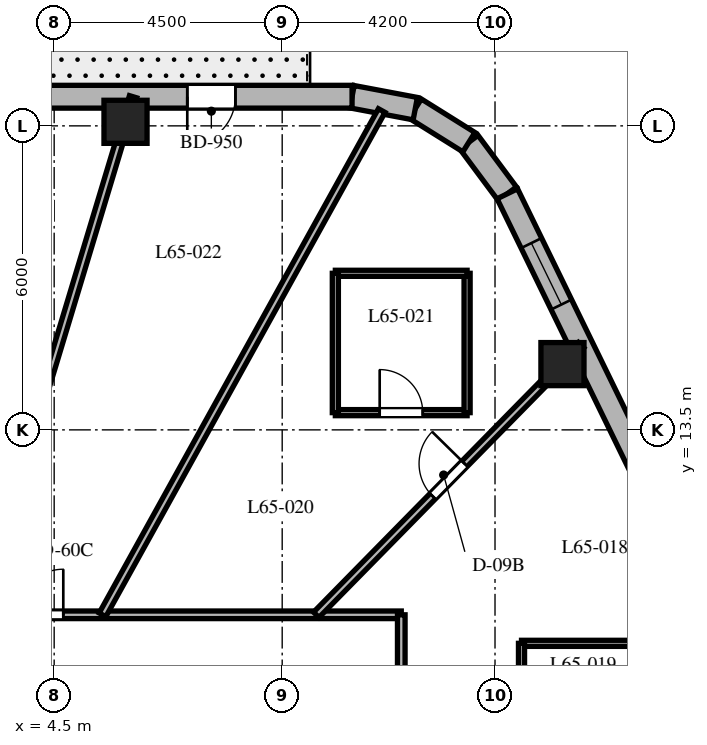
"""IFC4 building model, lengths in metres.
Left out: names, types, materials, properties, quantities, classifications, styles, units other than length and angle.
Written with IfcOpenShell. Run it as: python <this file> out.ifc"""

import sys

from ifc_helpers import new_model, si_unit, direction, frame, frame_2d, origin, origin_2d, place, context, subcontext, project, spatial, rectangle, extrude, element, fill, save


model = new_model("IFC4")
c1 = context("Model", 3, precision=1e-05, world=origin(), true_north=direction((0.0, 1.0)))
c2 = subcontext(c1, "Body", "Model", "MODEL_VIEW")
j1 = project(units=[si_unit("LENGTHUNIT", "METRE"), si_unit("PLANEANGLEUNIT", "RADIAN")], contexts=[c1])
p1 = place(None, origin())
s1 = spatial("IfcSite", under=j1, at=p1, CompositionType="ELEMENT")
p2 = place(p1, origin())
s2 = spatial("IfcBuilding", under=s1, at=p2, CompositionType="ELEMENT")
p3 = place(p2, frame((0.0, 0.0, 261.3)))
s3 = spatial("IfcBuildingStorey", under=s2, at=p3, CompositionType="ELEMENT", Elevation=261.3)
for number, where, z_axis, x_axis in (
    (1, (14.531, 14.798, 0.0), (0.0, 0.0, 1.0), (1.0, 0.0, 0.0)),
    (2, (5.908, 19.58, 0.0), (0.0, 0.0, 1.0), (1.0, 0.0, 0.0)),
):
    element("IfcColumn", number, at=place(p3, frame(where, z_axis=z_axis, x_axis=x_axis)), inside=s3, PredefinedType="COLUMN", context=c2, shape_type="SweptSolid", body=[
        extrude(rectangle(XDim=0.85, YDim=0.85, at=origin_2d()), origin(), (0.0, 0.0, 1.0), 3.9),
    ])
p4 = place(p3, frame((13.443, 18.16, 0.0), z_axis=(0.0, 0.0, 1.0), x_axis=(-0.597042425808, 0.802209661987, 0.0)))
e3 = element("IfcWall", 3, at=p4, inside=s3, PredefinedType="SOLIDWALL", context=c2, shape_type="SweptSolid", body=[
    extrude(rectangle(XDim=1.27, YDim=0.45, at=frame_2d((0.635, 0.0))), origin(), (0.0, 0.0, 1.0), 3.6),
])
p5 = place(p3, frame((12.685, 19.178, 0.0), z_axis=(0.0, 0.0, 1.0), x_axis=(-0.848031272749, 0.529946186362, 0.0)))
e4 = element("IfcWall", 4, at=p5, inside=s3, PredefinedType="SOLIDWALL", context=c2, shape_type="SweptSolid", body=[
    extrude(rectangle(XDim=1.248, YDim=0.45, at=frame_2d((0.624, 0.0))), origin(), (0.0, 0.0, 1.0), 3.6),
])
p6 = place(p3, frame((11.626, 19.84, 0.0), z_axis=(0.0, 0.0, 1.0), x_axis=(-0.982701956681, 0.185194126083, 0.0)))
e5 = element("IfcWall", 5, at=p6, inside=s3, PredefinedType="SOLIDWALL", context=c2, shape_type="SweptSolid", body=[
    extrude(rectangle(XDim=1.27, YDim=0.45, at=frame_2d((0.635, 0.0))), origin(), (0.0, 0.0, 1.0), 3.6),
])
p7 = place(p3, frame((21.138, 2.371, 0.0), z_axis=(0.0, 0.0, 1.0), x_axis=(-0.438128124058, 0.89891253574, 0.0)))
e6 = element("IfcWall", 6, at=p7, inside=s3, PredefinedType="SOLIDWALL", context=c2, shape_type="SweptSolid", body=[
    extrude(rectangle(XDim=17.565, YDim=0.45, at=frame_2d((8.782, 0.0))), origin(), (0.0, 0.0, 1.0), 3.6),
])
p8 = place(p7, frame((1.133, 0.0, 0.8)))
e7 = element("IfcOpeningElement", 7, at=p8, cuts=e6, PredefinedType="OPENING", context=c2, shape_type="SweptSolid", body=[
    extrude(rectangle(XDim=1.35, YDim=1.75, at=frame_2d((0.675, 0.875))), frame((0.0, 0.235, 0.0), z_axis=(0.0, -1.0, 0.0), x_axis=(1.0, 0.0, 0.0)), (0.0, 0.0, 1.0), 0.47),
])
p9 = place(p7, frame((8.158, 0.0, 0.8)))
e8 = element("IfcOpeningElement", 8, at=p9, cuts=e6, PredefinedType="OPENING", context=c2, shape_type="SweptSolid", body=[
    extrude(rectangle(XDim=1.35, YDim=1.75, at=frame_2d((0.675, 0.875))), frame((0.0, 0.235, 0.0), z_axis=(0.0, -1.0, 0.0), x_axis=(1.0, 0.0, 0.0)), (0.0, 0.0, 1.0), 0.47),
])
p10 = place(p7, frame((15.132, 0.0, 0.8)))
e9 = element("IfcOpeningElement", 9, at=p10, cuts=e6, PredefinedType="OPENING", context=c2, shape_type="SweptSolid", body=[
    extrude(rectangle(XDim=1.35, YDim=1.75, at=frame_2d((0.675, 0.875))), frame((0.0, 0.235, 0.0), z_axis=(0.0, -1.0, 0.0), x_axis=(1.0, 0.0, 0.0)), (0.0, 0.0, 1.0), 0.47),
])
p11 = place(p3, frame((10.379, 20.075, 0.0), z_axis=(0.0, 0.0, 1.0), x_axis=(-1.0, 0.0, 0.0)))
e10 = element("IfcWall", 10, at=p11, inside=s3, PredefinedType="SOLIDWALL", context=c2, shape_type="SweptSolid", body=[
    extrude(rectangle(XDim=22.417, YDim=0.45, at=frame_2d((11.208, 0.0))), origin(), (0.0, 0.0, 1.0), 3.6),
])
p12 = place(p11, frame((2.302, 0.0, 0.0)))
e11 = element("IfcOpeningElement", 11, at=p12, cuts=e10, PredefinedType="OPENING", context=c2, shape_type="SweptSolid", body=[
    extrude(rectangle(XDim=0.95, YDim=2.15, at=frame_2d((0.475, 1.075))), frame((0.0, 0.235, 0.0), z_axis=(0.0, -1.0, 0.0), x_axis=(1.0, 0.0, 0.0)), (0.0, 0.0, 1.0), 0.47),
])
p13 = place(p11, frame((7.022, 0.0, 0.8)))
e12 = element("IfcOpeningElement", 12, at=p13, cuts=e10, PredefinedType="OPENING", context=c2, shape_type="SweptSolid", body=[
    extrude(rectangle(XDim=1.35, YDim=1.75, at=frame_2d((0.675, 0.875))), frame((0.0, 0.235, 0.0), z_axis=(0.0, -1.0, 0.0), x_axis=(1.0, 0.0, 0.0)), (0.0, 0.0, 1.0), 0.47),
])
p14 = place(p11, frame((13.18, 0.0, 0.8)))
e13 = element("IfcOpeningElement", 13, at=p14, cuts=e10, PredefinedType="OPENING", context=c2, shape_type="SweptSolid", body=[
    extrude(rectangle(XDim=1.35, YDim=1.75, at=frame_2d((0.675, 0.875))), frame((0.0, 0.235, 0.0), z_axis=(0.0, -1.0, 0.0), x_axis=(1.0, 0.0, 0.0)), (0.0, 0.0, 1.0), 0.47),
])
p15 = place(p11, frame((19.587, 0.0, 0.8)))
e14 = element("IfcOpeningElement", 14, at=p15, cuts=e10, PredefinedType="OPENING", context=c2, shape_type="SweptSolid", body=[
    extrude(rectangle(XDim=1.35, YDim=1.75, at=frame_2d((0.675, 0.875))), frame((0.0, 0.235, 0.0), z_axis=(0.0, -1.0, 0.0), x_axis=(1.0, 0.0, 0.0)), (0.0, 0.0, 1.0), 0.47),
])
p16 = place(p3, frame((0.92, 9.85, 0.0), z_axis=(0.0, 0.0, 1.0), x_axis=(1.0, 0.0, 0.0)))
e15 = element("IfcWall", 15, at=p16, inside=s3, PredefinedType="PARTITIONING", context=c2, shape_type="SweptSolid", body=[
    extrude(rectangle(XDim=10.43, YDim=0.15, at=frame_2d((5.215, 0.0))), origin(), (0.0, 0.0, 1.0), 3.09),
])
p17 = place(p16, frame((2.86, 0.0, 0.0)))
e16 = element("IfcOpeningElement", 16, at=p17, cuts=e15, PredefinedType="OPENING", context=c2, shape_type="SweptSolid", body=[
    extrude(rectangle(XDim=0.9, YDim=2.03, at=frame_2d((0.45, 1.015))), frame((0.0, 0.085, 0.0), z_axis=(0.0, -1.0, 0.0), x_axis=(1.0, 0.0, 0.0)), (0.0, 0.0, 1.0), 0.17),
])
p18 = place(p3, frame((11.35, 9.85, 0.0), z_axis=(0.0, 0.0, 1.0), x_axis=(0.0, -1.0, 0.0)))
e17 = element("IfcWall", 17, at=p18, inside=s3, PredefinedType="PARTITIONING", context=c2, shape_type="SweptSolid", body=[
    extrude(rectangle(XDim=12.4, YDim=0.15, at=frame_2d((6.2, 0.0))), origin(), (0.0, 0.0, 1.0), 3.09),
])
p19 = place(p18, frame((7.697, 0.0, 0.0)))
e18 = element("IfcOpeningElement", 18, at=p19, cuts=e17, PredefinedType="OPENING", context=c2, shape_type="SweptSolid", body=[
    extrude(rectangle(XDim=0.95, YDim=2.03, at=frame_2d((0.475, 1.015))), frame((0.0, 0.085, 0.0), z_axis=(0.0, -1.0, 0.0), x_axis=(1.0, 0.0, 0.0)), (0.0, 0.0, 1.0), 0.17),
])
p20 = place(p18, frame((2.973, 0.0, 0.0)))
e19 = element("IfcOpeningElement", 19, at=p20, cuts=e17, PredefinedType="OPENING", context=c2, shape_type="SweptSolid", body=[
    extrude(rectangle(XDim=1.0, YDim=2.03, at=frame_2d((0.5, 1.015))), frame((0.0, 0.085, 0.0), z_axis=(0.0, -1.0, 0.0), x_axis=(1.0, 0.0, 0.0)), (0.0, 0.0, 1.0), 0.17),
])
p21 = place(p18, frame((10.333, 0.0, 0.0)))
e20 = element("IfcOpeningElement", 20, at=p21, cuts=e17, PredefinedType="OPENING", context=c2, shape_type="SweptSolid", body=[
    extrude(rectangle(XDim=0.9, YDim=2.03, at=frame_2d((0.45, 1.015))), frame((0.0, 0.085, 0.0), z_axis=(0.0, -1.0, 0.0), x_axis=(1.0, 0.0, 0.0)), (0.0, 0.0, 1.0), 0.17),
])
p22 = place(p3, frame((9.672, 9.85, 0.0), z_axis=(0.0, 0.0, 1.0), x_axis=(0.700629771301, 0.713524998558, 0.0)))
e21 = element("IfcWall", 21, at=p22, inside=s3, PredefinedType="PARTITIONING", context=c2, shape_type="SweptSolid", body=[
    extrude(rectangle(XDim=7.459, YDim=0.15, at=frame_2d((3.73, 0.0))), origin(), (0.0, 0.0, 1.0), 2.94),
])
p23 = place(p22, frame((3.28, 0.0, 0.0)))
e22 = element("IfcOpeningElement", 22, at=p23, cuts=e21, PredefinedType="OPENING", context=c2, shape_type="SweptSolid", body=[
    extrude(rectangle(XDim=0.9, YDim=2.03, at=frame_2d((0.45, 1.015))), frame((0.0, 0.085, 0.0), z_axis=(0.0, -1.0, 0.0), x_axis=(1.0, 0.0, 0.0)), (0.0, 0.0, 1.0), 0.17),
])
p24 = place(p3, frame((5.454, 9.85, 0.0), z_axis=(0.0, 0.0, 1.0), x_axis=(0.48439420613, 0.874849846012, 0.0)))
e23 = element("IfcWall", 23, at=p24, inside=s3, PredefinedType="PARTITIONING", context=c2, shape_type="SweptSolid", body=[
    extrude(rectangle(XDim=11.375, YDim=0.15, at=frame_2d((5.688, 0.0))), origin(), (0.0, 0.0, 1.0), 2.94),
])
p25 = place(p3, frame((2.972, 9.85, 0.0), z_axis=(0.0, 0.0, 1.0), x_axis=(0.288872169679, 0.957367677324, 0.0)))
e24 = element("IfcWall", 24, at=p25, inside=s3, PredefinedType="PARTITIONING", context=c2, shape_type="SweptSolid", body=[
    extrude(rectangle(XDim=10.68, YDim=0.15, at=frame_2d((5.34, 0.0))), origin(), (0.0, 0.0, 1.0), 2.94),
])
p26 = place(p3, frame((16.163, 9.287, 0.0), z_axis=(0.0, 0.0, 1.0), x_axis=(-1.0, 0.0, 0.0)))
e25 = element("IfcWall", 25, at=p26, inside=s3, PredefinedType="PARTITIONING", context=c2, shape_type="SweptSolid", body=[
    extrude(rectangle(XDim=2.44, YDim=0.12, at=frame_2d((1.22, 0.0))), origin(), (0.0, 0.0, 1.0), 3.126),
])
p27 = place(p3, frame((13.723, 9.287, 0.0), z_axis=(0.0, 0.0, 1.0), x_axis=(0.0, -1.0, 0.0)))
e26 = element("IfcWall", 26, at=p27, inside=s3, PredefinedType="PARTITIONING", context=c2, shape_type="SweptSolid", body=[
    extrude(rectangle(XDim=2.61, YDim=0.12, at=frame_2d((1.305, 0.0))), origin(), (0.0, 0.0, 1.0), 3.6),
])
p28 = place(p3, frame((10.049, 13.84, 0.0), z_axis=(0.0, 0.0, 1.0), x_axis=(1.0, 0.0, 0.0)))
e27 = element("IfcWall", 27, at=p28, inside=s3, PredefinedType="PARTITIONING", context=c2, shape_type="SweptSolid", body=[
    extrude(rectangle(XDim=2.6, YDim=0.12, at=frame_2d((1.3, 0.0))), origin(), (0.0, 0.0, 1.0), 3.6),
])
p29 = place(p28, frame((0.875, 0.0, 0.0)))
e28 = element("IfcOpeningElement", 28, at=p29, cuts=e27, PredefinedType="OPENING", context=c2, shape_type="SweptSolid", body=[
    extrude(rectangle(XDim=0.85, YDim=2.03, at=frame_2d((0.425, 1.015))), frame((0.0, 0.07, 0.0), z_axis=(0.0, -1.0, 0.0), x_axis=(1.0, 0.0, 0.0)), (0.0, 0.0, 1.0), 0.14),
])
p30 = place(p3, frame((12.649, 13.84, 0.0), z_axis=(0.0, 0.0, 1.0), x_axis=(0.0, 1.0, 0.0)))
e29 = element("IfcWall", 29, at=p30, inside=s3, PredefinedType="PARTITIONING", context=c2, shape_type="SweptSolid", body=[
    extrude(rectangle(XDim=2.75, YDim=0.12, at=frame_2d((1.375, 0.0))), origin(), (0.0, 0.0, 1.0), 2.94),
])
p31 = place(p3, frame((12.649, 16.59, 0.0), z_axis=(0.0, 0.0, 1.0), x_axis=(-1.0, 0.0, 0.0)))
e30 = element("IfcWall", 30, at=p31, inside=s3, PredefinedType="PARTITIONING", context=c2, shape_type="SweptSolid", body=[
    extrude(rectangle(XDim=2.6, YDim=0.12, at=frame_2d((1.3, 0.0))), origin(), (0.0, 0.0, 1.0), 2.94),
])
p32 = place(p3, frame((10.049, 16.59, 0.0), z_axis=(0.0, 0.0, 1.0), x_axis=(0.0, -1.0, 0.0)))
e31 = element("IfcWall", 31, at=p32, inside=s3, PredefinedType="PARTITIONING", context=c2, shape_type="SweptSolid", body=[
    extrude(rectangle(XDim=2.75, YDim=0.12, at=frame_2d((1.375, 0.0))), origin(), (0.0, 0.0, 1.0), 3.6),
])
p33 = place(p10, origin())
e32 = element("IfcWindow", 32, at=p33, inside=s3, PartitioningType="SINGLE_PANEL", PredefinedType="WINDOW", context=c2, shape_type="SweptSolid", body=[
    extrude(rectangle(XDim=1.35, YDim=1.75, at=frame_2d((0.675, 0.875))), frame((0.0, 0.03, 0.0), z_axis=(0.0, -1.0, 0.0), x_axis=(1.0, 0.0, 0.0)), (0.0, 0.0, 1.0), 0.06),
])
fill(e9, e32)
p34 = place(p12, origin())
e33 = element("IfcDoor", 33, at=p34, inside=s3, OperationType="SINGLE_SWING_RIGHT", PredefinedType="DOOR", context=c2, shape_type="SweptSolid", body=[
    extrude(rectangle(XDim=0.95, YDim=2.15, at=frame_2d((0.475, 1.075))), frame((0.0, 0.025, 0.0), z_axis=(0.0, -1.0, 0.0), x_axis=(1.0, 0.0, 0.0)), (0.0, 0.0, 1.0), 0.05),
])
fill(e11, e33)
p35 = place(p23, origin())
e34 = element("IfcDoor", 34, at=p35, inside=s3, OperationType="SINGLE_SWING_RIGHT", PredefinedType="DOOR", context=c2, shape_type="SweptSolid", body=[
    extrude(rectangle(XDim=0.9, YDim=2.03, at=frame_2d((0.45, 1.015))), frame((0.0, 0.025, 0.0), z_axis=(0.0, -1.0, 0.0), x_axis=(1.0, 0.0, 0.0)), (0.0, 0.0, 1.0), 0.05),
])
fill(e22, e34)
p36 = place(p29, origin())
e35 = element("IfcDoor", 35, at=p36, inside=s3, OperationType="SINGLE_SWING_LEFT", PredefinedType="DOOR", context=c2, shape_type="SweptSolid", body=[
    extrude(rectangle(XDim=0.85, YDim=2.03, at=frame_2d((0.425, 1.015))), frame((0.0, 0.025, 0.0), z_axis=(0.0, -1.0, 0.0), x_axis=(1.0, 0.0, 0.0)), (0.0, 0.0, 1.0), 0.05),
])
fill(e28, e35)
p37 = place(p17, origin())
e36 = element("IfcDoor", 36, at=p37, inside=s3, OperationType="SINGLE_SWING_RIGHT", PredefinedType="DOOR", context=c2, shape_type="SweptSolid", body=[
    extrude(rectangle(XDim=0.9, YDim=2.03, at=frame_2d((0.45, 1.015))), frame((0.0, 0.025, 0.0), z_axis=(0.0, -1.0, 0.0), x_axis=(1.0, 0.0, 0.0)), (0.0, 0.0, 1.0), 0.05),
])
fill(e16, e36)
save(model, sys.argv[1])
